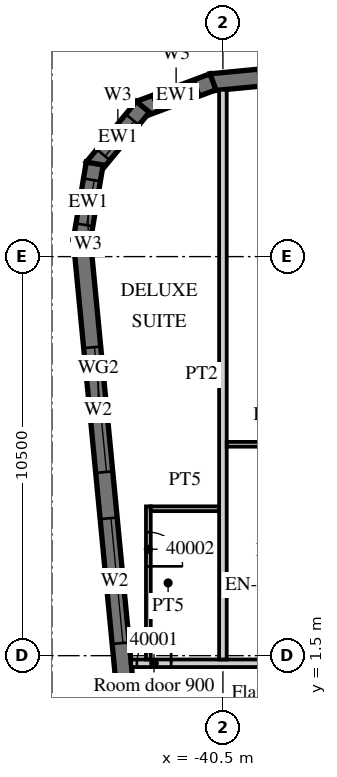
"""IFC4 building model, lengths in metres.
Left out: names, types, materials, properties, quantities, classifications, styles, units other than length and angle.
Written with IfcOpenShell. Run it as: python <this file> out.ifc"""

import sys

from ifc_helpers import new_model, si_unit, direction, frame, frame_2d, origin, place, context, subcontext, project, spatial, polyline, rectangle, outline, extrude, element, fill, save


model = new_model("IFC4")
c1 = context("Model", 3, precision=1e-05, world=origin(), true_north=direction((0.0, 1.0)))
c2 = subcontext(c1, "Body", "Model", "MODEL_VIEW")
j1 = project(units=[si_unit("LENGTHUNIT", "METRE"), si_unit("PLANEANGLEUNIT", "RADIAN")], contexts=[c1])
p1 = place(None, origin())
s1 = spatial("IfcSite", under=j1, at=p1, CompositionType="ELEMENT")
p2 = place(p1, origin())
s2 = spatial("IfcBuilding", under=s1, at=p2, CompositionType="ELEMENT")
p3 = place(p2, frame((0.0, 0.0, 173.5)))
s3 = spatial("IfcBuildingStorey", under=s2, at=p3, CompositionType="ELEMENT", Elevation=173.5)
p4 = place(p3, frame((-44.214, 12.466, 0.0), z_axis=(0.0, 0.0, 1.0), x_axis=(0.095847314626, -0.995396047952, 0.0)))
e1 = element("IfcWall", 1, at=p4, inside=s3, PredefinedType="SOLIDWALL", context=c2, shape_type="SweptSolid", body=[
    extrude(rectangle(XDim=34.0, YDim=0.45, at=frame_2d((17.0, 0.0))), origin(), (0.0, 0.0, 1.0), 3.02),
])
p5 = place(p4, frame((2.865, 0.0, 0.45)))
e2 = element("IfcOpeningElement", 2, at=p5, cuts=e1, PredefinedType="OPENING", context=c2, shape_type="SweptSolid", body=[
    extrude(rectangle(XDim=3.3, YDim=2.25, at=frame_2d((1.65, 1.125))), frame((0.0, 0.235, 0.0), z_axis=(0.0, -1.0, 0.0), x_axis=(1.0, 0.0, 0.0)), (0.0, 0.0, 1.0), 0.47),
])
p6 = place(p4, frame((7.386, 0.0, 0.45)))
e3 = element("IfcOpeningElement", 3, at=p6, cuts=e1, PredefinedType="OPENING", context=c2, shape_type="SweptSolid", body=[
    extrude(rectangle(XDim=3.3, YDim=2.25, at=frame_2d((1.65, 1.125))), frame((0.0, 0.235, 0.0), z_axis=(0.0, -1.0, 0.0), x_axis=(1.0, 0.0, 0.0)), (0.0, 0.0, 1.0), 0.47),
])
p7 = place(p3, frame((13.521, 21.817, 0.0), z_axis=(0.0, 0.0, 1.0), x_axis=(-0.995396508751, -0.095842529008, 0.0)))
e4 = element("IfcWall", 4, at=p7, inside=s3, PredefinedType="SOLIDWALL", context=c2, shape_type="SweptSolid", body=[
    extrude(rectangle(XDim=54.591, YDim=0.45, at=frame_2d((27.296, 0.0))), origin(), (0.0, 0.0, 1.0), 3.02),
])
p8 = place(p7, frame((0.91, 0.0, 0.45)))
e5 = element("IfcOpeningElement", 5, at=p8, cuts=e4, PredefinedType="OPENING", context=c2, shape_type="SweptSolid", body=[
    extrude(rectangle(XDim=2.7, YDim=2.25, at=frame_2d((1.35, 1.125))), frame((0.0, 0.235, 0.0), z_axis=(0.0, -1.0, 0.0), x_axis=(1.0, 0.0, 0.0)), (0.0, 0.0, 1.0), 0.47),
])
p9 = place(p7, frame((5.431, 0.0, 0.45)))
e6 = element("IfcOpeningElement", 6, at=p9, cuts=e4, PredefinedType="OPENING", context=c2, shape_type="SweptSolid", body=[
    extrude(rectangle(XDim=2.7, YDim=2.25, at=frame_2d((1.35, 1.125))), frame((0.0, 0.235, 0.0), z_axis=(0.0, -1.0, 0.0), x_axis=(1.0, 0.0, 0.0)), (0.0, 0.0, 1.0), 0.47),
])
p10 = place(p7, frame((9.952, 0.0, 0.45)))
e7 = element("IfcOpeningElement", 7, at=p10, cuts=e4, PredefinedType="OPENING", context=c2, shape_type="SweptSolid", body=[
    extrude(rectangle(XDim=2.7, YDim=2.25, at=frame_2d((1.35, 1.125))), frame((0.0, 0.235, 0.0), z_axis=(0.0, -1.0, 0.0), x_axis=(1.0, 0.0, 0.0)), (0.0, 0.0, 1.0), 0.47),
])
p11 = place(p7, frame((14.473, 0.0, 0.45)))
e8 = element("IfcOpeningElement", 8, at=p11, cuts=e4, PredefinedType="OPENING", context=c2, shape_type="SweptSolid", body=[
    extrude(rectangle(XDim=2.7, YDim=2.25, at=frame_2d((1.35, 1.125))), frame((0.0, 0.235, 0.0), z_axis=(0.0, -1.0, 0.0), x_axis=(1.0, 0.0, 0.0)), (0.0, 0.0, 1.0), 0.47),
])
p12 = place(p7, frame((18.994, 0.0, 0.45)))
e9 = element("IfcOpeningElement", 9, at=p12, cuts=e4, PredefinedType="OPENING", context=c2, shape_type="SweptSolid", body=[
    extrude(rectangle(XDim=2.7, YDim=2.25, at=frame_2d((1.35, 1.125))), frame((0.0, 0.235, 0.0), z_axis=(0.0, -1.0, 0.0), x_axis=(1.0, 0.0, 0.0)), (0.0, 0.0, 1.0), 0.47),
])
p13 = place(p7, frame((23.514, 0.0, 0.45)))
e10 = element("IfcOpeningElement", 10, at=p13, cuts=e4, PredefinedType="OPENING", context=c2, shape_type="SweptSolid", body=[
    extrude(rectangle(XDim=2.7, YDim=2.25, at=frame_2d((1.35, 1.125))), frame((0.0, 0.235, 0.0), z_axis=(0.0, -1.0, 0.0), x_axis=(1.0, 0.0, 0.0)), (0.0, 0.0, 1.0), 0.47),
])
p14 = place(p7, frame((28.035, 0.0, 0.45)))
e11 = element("IfcOpeningElement", 11, at=p14, cuts=e4, PredefinedType="OPENING", context=c2, shape_type="SweptSolid", body=[
    extrude(rectangle(XDim=2.7, YDim=2.25, at=frame_2d((1.35, 1.125))), frame((0.0, 0.235, 0.0), z_axis=(0.0, -1.0, 0.0), x_axis=(1.0, 0.0, 0.0)), (0.0, 0.0, 1.0), 0.47),
])
p15 = place(p7, frame((32.556, 0.0, 0.45)))
e12 = element("IfcOpeningElement", 12, at=p15, cuts=e4, PredefinedType="OPENING", context=c2, shape_type="SweptSolid", body=[
    extrude(rectangle(XDim=2.7, YDim=2.25, at=frame_2d((1.35, 1.125))), frame((0.0, 0.235, 0.0), z_axis=(0.0, -1.0, 0.0), x_axis=(1.0, 0.0, 0.0)), (0.0, 0.0, 1.0), 0.47),
])
p16 = place(p7, frame((37.077, 0.0, 0.45)))
e13 = element("IfcOpeningElement", 13, at=p16, cuts=e4, PredefinedType="OPENING", context=c2, shape_type="SweptSolid", body=[
    extrude(rectangle(XDim=2.7, YDim=2.25, at=frame_2d((1.35, 1.125))), frame((0.0, 0.235, 0.0), z_axis=(0.0, -1.0, 0.0), x_axis=(1.0, 0.0, 0.0)), (0.0, 0.0, 1.0), 0.47),
])
p17 = place(p7, frame((41.598, 0.0, 0.45)))
e14 = element("IfcOpeningElement", 14, at=p17, cuts=e4, PredefinedType="OPENING", context=c2, shape_type="SweptSolid", body=[
    extrude(rectangle(XDim=2.7, YDim=2.25, at=frame_2d((1.35, 1.125))), frame((0.0, 0.235, 0.0), z_axis=(0.0, -1.0, 0.0), x_axis=(1.0, 0.0, 0.0)), (0.0, 0.0, 1.0), 0.47),
])
p18 = place(p7, frame((46.118, 0.0, 0.45)))
e15 = element("IfcOpeningElement", 15, at=p18, cuts=e4, PredefinedType="OPENING", context=c2, shape_type="SweptSolid", body=[
    extrude(rectangle(XDim=2.7, YDim=2.25, at=frame_2d((1.35, 1.125))), frame((0.0, 0.235, 0.0), z_axis=(0.0, -1.0, 0.0), x_axis=(1.0, 0.0, 0.0)), (0.0, 0.0, 1.0), 0.47),
])
p19 = place(p7, frame((50.629, 0.0, 0.45)))
e16 = element("IfcOpeningElement", 16, at=p19, cuts=e4, PredefinedType="OPENING", context=c2, shape_type="SweptSolid", body=[
    extrude(rectangle(XDim=2.7, YDim=2.25, at=frame_2d((1.35, 1.125))), frame((0.0, 0.235, 0.0), z_axis=(0.0, -1.0, 0.0), x_axis=(1.0, 0.0, 0.0)), (0.0, 0.0, 1.0), 0.47),
])
p20 = place(p3, frame((-40.761, 16.598, 0.0), z_axis=(0.0, 0.0, 1.0), x_axis=(-0.936677599948, -0.350192909346, 0.0)))
e17 = element("IfcWall", 17, at=p20, inside=s3, PredefinedType="SOLIDWALL", context=c2, shape_type="SweptSolid", body=[
    extrude(outline(polyline([(0.0, -0.225), (2.071, -0.225), (1.95, 0.225), (0.121, 0.225), (0.0, -0.225)])), origin(), (0.0, 0.0, 1.0), 3.02),
])
p21 = place(p20, frame((0.435, 0.0, 0.45)))
e18 = element("IfcOpeningElement", 18, at=p21, cuts=e17, PredefinedType="OPENING", context=c2, shape_type="SweptSolid", body=[
    extrude(rectangle(XDim=1.2, YDim=2.25, at=frame_2d((0.6, 1.125))), frame((0.0, 0.235, 0.0), z_axis=(0.0, -1.0, 0.0), x_axis=(1.0, 0.0, 0.0)), (0.0, 0.0, 1.0), 0.47),
])
p22 = place(p3, frame((-42.606, 15.941, 0.0), z_axis=(0.0, 0.0, 1.0), x_axis=(-0.636116318187, -0.771593176315, 0.0)))
e19 = element("IfcWall", 19, at=p22, inside=s3, PredefinedType="SOLIDWALL", context=c2, shape_type="SweptSolid", body=[
    extrude(outline(polyline([(0.0, -0.225), (2.071, -0.225), (1.95, 0.225), (0.121, 0.225), (0.0, -0.225)])), origin(), (0.0, 0.0, 1.0), 3.02),
])
p23 = place(p22, frame((0.435, 0.0, 0.45)))
e20 = element("IfcOpeningElement", 20, at=p23, cuts=e19, PredefinedType="OPENING", context=c2, shape_type="SweptSolid", body=[
    extrude(rectangle(XDim=1.2, YDim=2.25, at=frame_2d((0.6, 1.125))), frame((0.0, 0.235, 0.0), z_axis=(0.0, -1.0, 0.0), x_axis=(1.0, 0.0, 0.0)), (0.0, 0.0, 1.0), 0.47),
])
p24 = place(p3, frame((-43.875, 14.449, 0.0), z_axis=(0.0, 0.0, 1.0), x_axis=(-0.164953448126, -0.986301353518, 0.0)))
e21 = element("IfcWall", 21, at=p24, inside=s3, PredefinedType="SOLIDWALL", context=c2, shape_type="SweptSolid", body=[
    extrude(outline(polyline([(0.0, -0.225), (2.071, -0.225), (1.95, 0.225), (0.121, 0.225), (0.0, -0.225)])), origin(), (0.0, 0.0, 1.0), 3.02),
])
p25 = place(p24, frame((0.435, 0.0, 0.45)))
e22 = element("IfcOpeningElement", 22, at=p25, cuts=e21, PredefinedType="OPENING", context=c2, shape_type="SweptSolid", body=[
    extrude(rectangle(XDim=1.2, YDim=2.25, at=frame_2d((0.6, 1.125))), frame((0.0, 0.235, 0.0), z_axis=(0.0, -1.0, 0.0), x_axis=(1.0, 0.0, 0.0)), (0.0, 0.0, 1.0), 0.47),
])
p26 = place(p3, frame((-42.913, 1.3, 0.0), z_axis=(0.0, 0.0, 1.0), x_axis=(1.0, 0.0, 0.0)))
e23 = element("IfcWall", 23, at=p26, inside=s3, PredefinedType="PARTITIONING", context=c2, shape_type="SweptSolid", body=[
    extrude(rectangle(XDim=29.413, YDim=0.2, at=frame_2d((14.707, 0.0))), origin(), (0.0, 0.0, 1.0), 3.02),
])
p27 = place(p26, frame((0.15, 0.0, 0.0)))
e24 = element("IfcOpeningElement", 24, at=p27, cuts=e23, PredefinedType="OPENING", context=c2, shape_type="SweptSolid", body=[
    extrude(rectangle(XDim=0.9, YDim=2.1, at=frame_2d((0.45, 1.05))), frame((0.0, 0.11, 0.0), z_axis=(0.0, -1.0, 0.0), x_axis=(1.0, 0.0, 0.0)), (0.0, 0.0, 1.0), 0.22),
])
p28 = place(p26, frame((5.338, 0.0, 0.0)))
e25 = element("IfcOpeningElement", 25, at=p28, cuts=e23, PredefinedType="OPENING", context=c2, shape_type="SweptSolid", body=[
    extrude(rectangle(XDim=1.0, YDim=2.1, at=frame_2d((0.5, 1.05))), frame((0.0, 0.11, 0.0), z_axis=(0.0, -1.0, 0.0), x_axis=(1.0, 0.0, 0.0)), (0.0, 0.0, 1.0), 0.22),
])
p29 = place(p26, frame((7.488, 0.0, 0.0)))
e26 = element("IfcOpeningElement", 26, at=p29, cuts=e23, PredefinedType="OPENING", context=c2, shape_type="SweptSolid", body=[
    extrude(rectangle(XDim=1.0, YDim=2.1, at=frame_2d((0.5, 1.05))), frame((0.0, 0.11, 0.0), z_axis=(0.0, -1.0, 0.0), x_axis=(1.0, 0.0, 0.0)), (0.0, 0.0, 1.0), 0.22),
])
p30 = place(p26, frame((11.963, 0.0, 0.0)))
e27 = element("IfcOpeningElement", 27, at=p30, cuts=e23, PredefinedType="OPENING", context=c2, shape_type="SweptSolid", body=[
    extrude(rectangle(XDim=1.0, YDim=2.1, at=frame_2d((0.5, 1.05))), frame((0.0, 0.11, 0.0), z_axis=(0.0, -1.0, 0.0), x_axis=(1.0, 0.0, 0.0)), (0.0, 0.0, 1.0), 0.22),
])
p31 = place(p26, frame((21.275, 0.0, 0.0)))
e28 = element("IfcOpeningElement", 28, at=p31, cuts=e23, PredefinedType="OPENING", context=c2, shape_type="SweptSolid", body=[
    extrude(rectangle(XDim=1.2, YDim=2.1, at=frame_2d((0.6, 1.05))), frame((0.0, 0.11, 0.0), z_axis=(0.0, -1.0, 0.0), x_axis=(1.0, 0.0, 0.0)), (0.0, 0.0, 1.0), 0.22),
])
p32 = place(p26, frame((27.838, 0.0, 0.0)))
e29 = element("IfcOpeningElement", 29, at=p32, cuts=e23, PredefinedType="OPENING", context=c2, shape_type="SweptSolid", body=[
    extrude(rectangle(XDim=1.0, YDim=2.1, at=frame_2d((0.5, 1.05))), frame((0.0, 0.11, 0.0), z_axis=(0.0, -1.0, 0.0), x_axis=(1.0, 0.0, 0.0)), (0.0, 0.0, 1.0), 0.22),
])
p33 = place(p3, frame((-40.5, 1.4, 0.0), z_axis=(0.0, 0.0, 1.0), x_axis=(0.0, 1.0, 0.0)))
e30 = element("IfcWall", 30, at=p33, inside=s3, PredefinedType="PARTITIONING", context=c2, shape_type="SweptSolid", body=[
    extrude(rectangle(XDim=14.99, YDim=0.2, at=frame_2d((7.495, 0.0))), origin(), (0.0, 0.0, 1.0), 3.02),
])
p34 = place(p3, frame((-42.462, 1.4, 0.0), z_axis=(0.0, 0.0, 1.0), x_axis=(0.0, 1.0, 0.0)))
e31 = element("IfcWall", 31, at=p34, inside=s3, PredefinedType="PARTITIONING", context=c2, shape_type="SweptSolid", body=[
    extrude(rectangle(XDim=4.028, YDim=0.125, at=frame_2d((2.014, 0.0))), origin(), (0.0, 0.0, 1.0), 3.02),
])
p35 = place(p34, frame((2.45, 0.0, 0.0)))
e32 = element("IfcOpeningElement", 32, at=p35, cuts=e31, PredefinedType="OPENING", context=c2, shape_type="SweptSolid", body=[
    extrude(rectangle(XDim=0.9, YDim=2.1, at=frame_2d((0.45, 1.05))), frame((0.0, 0.073, 0.0), z_axis=(0.0, -1.0, 0.0), x_axis=(1.0, 0.0, 0.0)), (0.0, 0.0, 1.0), 0.145),
])
p36 = place(p3, frame((-42.4, 5.366, 0.0), z_axis=(0.0, 0.0, 1.0), x_axis=(1.0, 0.0, 0.0)))
e33 = element("IfcWall", 33, at=p36, inside=s3, PredefinedType="PARTITIONING", context=c2, shape_type="SweptSolid", body=[
    extrude(rectangle(XDim=1.8, YDim=0.125, at=frame_2d((0.9, 0.0))), origin(), (0.0, 0.0, 1.0), 3.02),
])
p37 = place(p3, frame((-40.4, 7.062, 0.0), z_axis=(0.0, 0.0, 1.0), x_axis=(1.0, 0.0, 0.0)))
e34 = element("IfcWall", 34, at=p37, inside=s3, PredefinedType="PARTITIONING", context=c2, shape_type="SweptSolid", body=[
    extrude(rectangle(XDim=2.25, YDim=0.125, at=frame_2d((1.125, 0.0))), origin(), (0.0, 0.0, 1.0), 3.02),
])
p38 = place(p5, origin())
e35 = element("IfcWindow", 35, at=p38, inside=s3, PartitioningType="SINGLE_PANEL", PredefinedType="WINDOW", context=c2, shape_type="SweptSolid", body=[
    extrude(rectangle(XDim=3.3, YDim=2.25, at=frame_2d((1.65, 1.125))), frame((0.0, 0.09, 0.0), z_axis=(0.0, -1.0, 0.0), x_axis=(1.0, 0.0, 0.0)), (0.0, 0.0, 1.0), 0.06),
])
fill(e2, e35)
p39 = place(p6, origin())
e36 = element("IfcWindow", 36, at=p39, inside=s3, PartitioningType="SINGLE_PANEL", PredefinedType="WINDOW", context=c2, shape_type="SweptSolid", body=[
    extrude(rectangle(XDim=3.3, YDim=2.25, at=frame_2d((1.65, 1.125))), frame((0.0, 0.09, 0.0), z_axis=(0.0, -1.0, 0.0), x_axis=(1.0, 0.0, 0.0)), (0.0, 0.0, 1.0), 0.06),
])
fill(e3, e36)
p40 = place(p21, origin())
e37 = element("IfcWindow", 37, at=p40, inside=s3, PartitioningType="SINGLE_PANEL", PredefinedType="WINDOW", context=c2, shape_type="SweptSolid", body=[
    extrude(rectangle(XDim=1.2, YDim=2.25, at=frame_2d((0.6, 1.125))), frame((0.0, 0.09, 0.0), z_axis=(0.0, -1.0, 0.0), x_axis=(1.0, 0.0, 0.0)), (0.0, 0.0, 1.0), 0.06),
])
fill(e18, e37)
p41 = place(p23, origin())
e38 = element("IfcWindow", 38, at=p41, inside=s3, PartitioningType="SINGLE_PANEL", PredefinedType="WINDOW", context=c2, shape_type="SweptSolid", body=[
    extrude(rectangle(XDim=1.2, YDim=2.25, at=frame_2d((0.6, 1.125))), frame((0.0, 0.09, 0.0), z_axis=(0.0, -1.0, 0.0), x_axis=(1.0, 0.0, 0.0)), (0.0, 0.0, 1.0), 0.06),
])
fill(e20, e38)
p42 = place(p25, origin())
e39 = element("IfcWindow", 39, at=p42, inside=s3, PartitioningType="SINGLE_PANEL", PredefinedType="WINDOW", context=c2, shape_type="SweptSolid", body=[
    extrude(rectangle(XDim=1.2, YDim=2.25, at=frame_2d((0.6, 1.125))), frame((0.0, 0.09, 0.0), z_axis=(0.0, -1.0, 0.0), x_axis=(1.0, 0.0, 0.0)), (0.0, 0.0, 1.0), 0.06),
])
fill(e22, e39)
p43 = place(p27, origin())
e40 = element("IfcDoor", 40, at=p43, inside=s3, OperationType="SINGLE_SWING_RIGHT", PredefinedType="DOOR", context=c2, shape_type="SweptSolid", body=[
    extrude(rectangle(XDim=0.9, YDim=2.1, at=frame_2d((0.45, 1.05))), frame((0.0, 0.025, 0.0), z_axis=(0.0, -1.0, 0.0), x_axis=(1.0, 0.0, 0.0)), (0.0, 0.0, 1.0), 0.05),
])
fill(e24, e40)
p44 = place(p35, origin())
e41 = element("IfcDoor", 41, at=p44, inside=s3, OperationType="SINGLE_SWING_LEFT", PredefinedType="DOOR", context=c2, shape_type="SweptSolid", body=[
    extrude(rectangle(XDim=0.9, YDim=2.1, at=frame_2d((0.45, 1.05))), frame((0.0, 0.025, 0.0), z_axis=(0.0, -1.0, 0.0), x_axis=(1.0, 0.0, 0.0)), (0.0, 0.0, 1.0), 0.05),
])
fill(e32, e41)
save(model, sys.argv[1])
